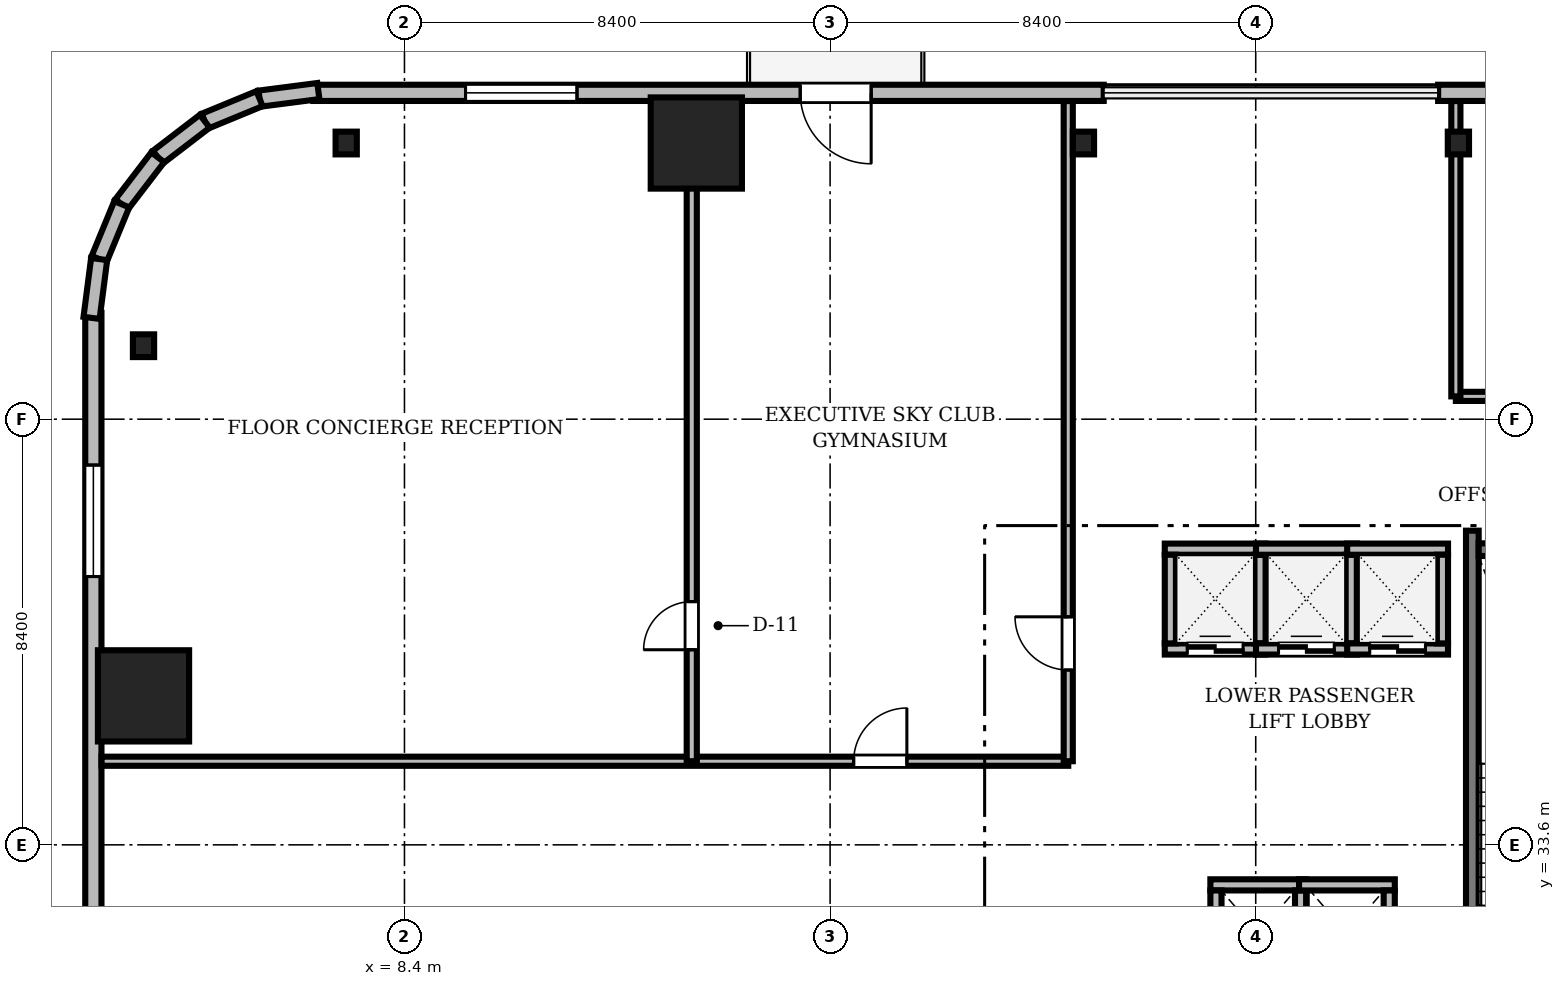
"""IFC4 building model, lengths in metres.
Left out: names, types, materials, properties, quantities, classifications, styles, units other than length and angle.
Written with IfcOpenShell. Run it as: python <this file> out.ifc"""

import sys

from ifc_helpers import new_model, si_unit, direction, frame, frame_2d, origin, origin_2d, place, context, subcontext, project, spatial, rectangle, i_section, extrude, source, transform, mapped, element, fill, save


model = new_model("IFC4")
c1 = context("Model", 3, precision=1e-05, world=origin(), true_north=direction((0.0, 1.0)))
c2 = subcontext(c1, "Body", "Model", "MODEL_VIEW")
j1 = project(units=[si_unit("LENGTHUNIT", "METRE"), si_unit("PLANEANGLEUNIT", "RADIAN")], contexts=[c1])
p1 = place(None, origin())
s1 = spatial("IfcSite", under=j1, at=p1, CompositionType="ELEMENT")
p2 = place(p1, origin())
s2 = spatial("IfcBuilding", under=s1, at=p2, CompositionType="ELEMENT")
p3 = place(p2, frame((0.0, 0.0, 82.35)))
s3 = spatial("IfcBuildingStorey", under=s2, at=p3, CompositionType="ELEMENT", Elevation=82.35)
m1 = source(origin(), c2, "Body", "SweptSolid", [
    extrude(rectangle(XDim=1.8, YDim=1.8, at=origin_2d()), origin(), (0.0, 0.0, 1.0), 3.41),
])
for number, where, z_axis, x_axis in (
    (1, (14.16, 47.45, 0.0), (0.0, 0.0, 1.0), (1.0, 0.0, 0.0)),
    (2, (3.25, 36.54, 0.0), (0.0, 0.0, 1.0), (1.0, 0.0, 0.0)),
):
    element("IfcColumn", number, at=place(p3, frame(where, z_axis=z_axis, x_axis=x_axis)), inside=s3, PredefinedType="COLUMN", context=c2, shape_type="MappedRepresentation", body=[
        mapped(m1, transform((0.0, 0.0, 0.0), scale=1.0)),
    ])
m2 = source(origin(), c2, "Body", "SweptSolid", [
    extrude(i_section(OverallWidth=0.419, OverallDepth=0.449, WebThickness=0.031, FlangeThickness=0.048, FilletRadius=0.015, at=origin_2d()), origin(), (0.0, 0.0, 1.0), 3.41),
])
for number, where, z_axis, x_axis in (
    (3, (29.2, 47.45, 0.0), (0.0, 0.0, 1.0), (1.0, 0.0, 0.0)),
    (4, (21.8, 47.45, 0.0), (0.0, 0.0, 1.0), (1.0, 0.0, 0.0)),
    (5, (7.25, 47.45, 0.0), (0.0, 0.0, 1.0), (1.0, 0.0, 0.0)),
    (6, (3.25, 43.45, 0.0), (0.0, 0.0, 1.0), (1.0, 0.0, 0.0)),
):
    element("IfcColumn", number, at=place(p3, frame(where, z_axis=z_axis, x_axis=x_axis)), inside=s3, PredefinedType="COLUMN", context=c2, shape_type="MappedRepresentation", body=[
        mapped(m2, transform((0.0, 0.0, 0.0), scale=1.0)),
    ])
m3 = source(origin(), c2, "Body", "SweptSolid", [
    extrude(rectangle(XDim=15.6, YDim=0.32, at=frame_2d((7.8, 0.0))), origin(), (0.0, 0.0, 1.0), 3.41),
])
p4 = place(p3, frame((44.4, 48.44, 0.0), z_axis=(0.0, 0.0, 1.0), x_axis=(-1.0, 0.0, 0.0)))
e7 = element("IfcWall", 7, at=p4, inside=s3, PredefinedType="SOLIDWALL", context=c2, shape_type="MappedRepresentation", body=[
    mapped(m3, transform((0.0, 0.0, 0.0), scale=1.0)),
])
m4 = source(origin(), c2, "Body", "SweptSolid", [
    extrude(rectangle(XDim=2.2, YDim=2.4, at=frame_2d((1.1, 1.2))), frame((0.0, 0.17, 0.0), z_axis=(0.0, -1.0, 0.0), x_axis=(1.0, 0.0, 0.0)), (0.0, 0.0, 1.0), 0.34),
])
p5 = place(p4, frame((3.005, 0.0, 0.72)))
e8 = element("IfcOpeningElement", 8, at=p5, cuts=e7, PredefinedType="OPENING", context=c2, shape_type="MappedRepresentation", body=[
    mapped(m4, transform((0.0, 0.0, 0.0), scale=1.0)),
])
p6 = place(p3, frame((22.2, 48.44, 0.0), z_axis=(0.0, 0.0, 1.0), x_axis=(-1.0, 0.0, 0.0)))
e9 = element("IfcWall", 9, at=p6, inside=s3, PredefinedType="SOLIDWALL", context=c2, shape_type="MappedRepresentation", body=[
    mapped(m3, transform((0.0, 0.0, 0.0), scale=1.0)),
])
m5 = source(origin(), c2, "Body", "SweptSolid", [
    extrude(rectangle(XDim=1.4, YDim=2.3, at=frame_2d((0.7, 1.15))), frame((0.0, 0.17, 0.0), z_axis=(0.0, -1.0, 0.0), x_axis=(1.0, 0.0, 0.0)), (0.0, 0.0, 1.0), 0.34),
])
p7 = place(p6, frame((4.59, 0.0, 0.0)))
e10 = element("IfcOpeningElement", 10, at=p7, cuts=e9, PredefinedType="OPENING", context=c2, shape_type="MappedRepresentation", body=[
    mapped(m5, transform((0.0, 0.0, 0.0), scale=1.0)),
])
p8 = place(p6, frame((10.395, 0.0, 0.72)))
e11 = element("IfcOpeningElement", 11, at=p8, cuts=e9, PredefinedType="OPENING", context=c2, shape_type="MappedRepresentation", body=[
    mapped(m4, transform((0.0, 0.0, 0.0), scale=1.0)),
])
m6 = source(origin(), c2, "Body", "SweptSolid", [
    extrude(rectangle(XDim=15.6, YDim=0.32, at=frame_2d((7.8, 0.0))), origin(), (0.0, 0.0, 1.0), 3.41),
])
p9 = place(p3, frame((2.26, 44.1, 0.0), z_axis=(0.0, 0.0, 1.0), x_axis=(0.0, -1.0, 0.0)))
e12 = element("IfcWall", 12, at=p9, inside=s3, PredefinedType="SOLIDWALL", context=c2, shape_type="MappedRepresentation", body=[
    mapped(m6, transform((0.0, 0.0, 0.0), scale=1.0)),
])
p10 = place(p9, frame((3.005, 0.0, 0.72)))
e13 = element("IfcOpeningElement", 13, at=p10, cuts=e12, PredefinedType="OPENING", context=c2, shape_type="MappedRepresentation", body=[
    mapped(m4, transform((0.0, 0.0, 0.0), scale=1.0)),
])
m7 = source(origin(), c2, "Body", "SweptSolid", [
    extrude(rectangle(XDim=1.17, YDim=0.32, at=frame_2d((0.585, 0.0))), origin(), (0.0, 0.0, 1.0), 3.41),
])
p11 = place(p3, frame((6.7, 48.476, 0.0), z_axis=(0.0, 0.0, 1.0), x_axis=(-0.991735963317, -0.128295670475, 0.0)))
e14 = element("IfcWall", 14, at=p11, inside=s3, PredefinedType="SOLIDWALL", context=c2, shape_type="MappedRepresentation", body=[
    mapped(m7, transform((0.0, 0.0, 0.0), scale=1.0)),
])
m8 = source(origin(), c2, "Body", "SweptSolid", [
    extrude(rectangle(XDim=1.169, YDim=0.32, at=frame_2d((0.584, 0.0))), origin(), (0.0, 0.0, 1.0), 3.41),
])
p12 = place(p3, frame((5.54, 48.325, 0.0), z_axis=(0.0, 0.0, 1.0), x_axis=(-0.924552646638, -0.381054331552, 0.0)))
e15 = element("IfcWall", 15, at=p12, inside=s3, PredefinedType="SOLIDWALL", context=c2, shape_type="MappedRepresentation", body=[
    mapped(m8, transform((0.0, 0.0, 0.0), scale=1.0)),
])
m9 = source(origin(), c2, "Body", "SweptSolid", [
    extrude(rectangle(XDim=1.169, YDim=0.32, at=frame_2d((0.584, 0.0))), origin(), (0.0, 0.0, 1.0), 3.41),
])
p13 = place(p3, frame((4.459, 47.88, 0.0), z_axis=(0.0, 0.0, 1.0), x_axis=(-0.793663520347, -0.608356981114, 0.0)))
e16 = element("IfcWall", 16, at=p13, inside=s3, PredefinedType="SOLIDWALL", context=c2, shape_type="MappedRepresentation", body=[
    mapped(m9, transform((0.0, 0.0, 0.0), scale=1.0)),
])
m10 = source(origin(), c2, "Body", "SweptSolid", [
    extrude(rectangle(XDim=1.169, YDim=0.32, at=frame_2d((0.584, 0.0))), origin(), (0.0, 0.0, 1.0), 3.41),
])
p14 = place(p3, frame((3.531, 47.169, 0.0), z_axis=(0.0, 0.0, 1.0), x_axis=(-0.608387696831, -0.793639975269, 0.0)))
e17 = element("IfcWall", 17, at=p14, inside=s3, PredefinedType="SOLIDWALL", context=c2, shape_type="MappedRepresentation", body=[
    mapped(m10, transform((0.0, 0.0, 0.0), scale=1.0)),
])
p15 = place(p3, frame((2.82, 46.241, 0.0), z_axis=(0.0, 0.0, 1.0), x_axis=(-0.381054331552, -0.924552646638, 0.0)))
e18 = element("IfcWall", 18, at=p15, inside=s3, PredefinedType="SOLIDWALL", context=c2, shape_type="MappedRepresentation", body=[
    mapped(m8, transform((0.0, 0.0, 0.0), scale=1.0)),
])
p16 = place(p3, frame((2.375, 45.16, 0.0), z_axis=(0.0, 0.0, 1.0), x_axis=(-0.128295670475, -0.991735963317, 0.0)))
e19 = element("IfcWall", 19, at=p16, inside=s3, PredefinedType="SOLIDWALL", context=c2, shape_type="MappedRepresentation", body=[
    mapped(m7, transform((0.0, 0.0, 0.0), scale=1.0)),
])
m11 = source(origin(), c2, "Body", "SweptSolid", [
    extrude(rectangle(XDim=9.15, YDim=0.25, at=frame_2d((4.575, 0.0))), origin(), (0.0, 0.0, 1.0), 3.45),
])
p17 = place(p3, frame((29.475, 30.65, 0.0), z_axis=(0.0, 0.0, 1.0), x_axis=(0.0, 1.0, 0.0)))
e20 = element("IfcWall", 20, at=p17, inside=s3, PredefinedType="SOLIDWALL", context=c2, shape_type="MappedRepresentation", body=[
    mapped(m11, transform((0.0, 0.0, 0.0), scale=1.0)),
])
m12 = source(origin(), c2, "Body", "SweptSolid", [
    extrude(rectangle(XDim=3.15, YDim=0.25, at=frame_2d((1.575, 0.0))), origin(), (0.0, 0.0, 1.0), 3.45),
])
p18 = place(p3, frame((29.6, 39.425, 0.0), z_axis=(0.0, 0.0, 1.0), x_axis=(1.0, 0.0, 0.0)))
e21 = element("IfcWall", 21, at=p18, inside=s3, PredefinedType="SOLIDWALL", context=c2, shape_type="MappedRepresentation", body=[
    mapped(m12, transform((0.0, 0.0, 0.0), scale=1.0)),
])
m13 = source(origin(), c2, "Body", "SweptSolid", [
    extrude(rectangle(XDim=1.99, YDim=0.22, at=frame_2d((0.995, 0.0))), origin(), (0.0, 0.0, 1.0), 3.41),
])
p19 = place(p3, frame((23.405, 37.465, 0.0), z_axis=(0.0, 0.0, 1.0), x_axis=(1.0, 0.0, 0.0)))
e22 = element("IfcWall", 22, at=p19, inside=s3, PredefinedType="SOLIDWALL", context=c2, shape_type="MappedRepresentation", body=[
    mapped(m13, transform((0.0, 0.0, 0.0), scale=1.0)),
])
m14 = source(origin(), c2, "Body", "SweptSolid", [
    extrude(rectangle(XDim=1.1, YDim=2.2, at=frame_2d((0.55, 1.1))), frame((0.0, 0.12, 0.0), z_axis=(0.0, -1.0, 0.0), x_axis=(1.0, 0.0, 0.0)), (0.0, 0.0, 1.0), 0.24),
])
p20 = place(p19, frame((0.445, 0.0, 0.0)))
e23 = element("IfcOpeningElement", 23, at=p20, cuts=e22, PredefinedType="OPENING", context=c2, shape_type="MappedRepresentation", body=[
    mapped(m14, transform((0.0, 0.0, 0.0), scale=1.0)),
])
p21 = place(p3, frame((23.405, 39.435, 0.0), z_axis=(0.0, 0.0, 1.0), x_axis=(1.0, 0.0, 0.0)))
e24 = element("IfcWall", 24, at=p21, inside=s3, PredefinedType="SOLIDWALL", context=c2, shape_type="MappedRepresentation", body=[
    mapped(m13, transform((0.0, 0.0, 0.0), scale=1.0)),
])
m15 = source(origin(), c2, "Body", "SweptSolid", [
    extrude(rectangle(XDim=1.75, YDim=0.22, at=frame_2d((0.875, 0.0))), origin(), (0.0, 0.0, 1.0), 3.41),
])
for number, where, z_axis, x_axis in (
    (25, (23.515, 37.575, 0.0), (0.0, 0.0, 1.0), (0.0, 1.0, 0.0)),
    (26, (25.285, 37.575, 0.0), (0.0, 0.0, 1.0), (0.0, 1.0, 0.0)),
):
    element("IfcWall", number, at=place(p3, frame(where, z_axis=z_axis, x_axis=x_axis)), inside=s3, PredefinedType="SOLIDWALL", context=c2, shape_type="MappedRepresentation", body=[
        mapped(m15, transform((0.0, 0.0, 0.0), scale=1.0)),
    ])
p22 = place(p3, frame((25.205, 37.465, 0.0), z_axis=(0.0, 0.0, 1.0), x_axis=(1.0, 0.0, 0.0)))
e27 = element("IfcWall", 27, at=p22, inside=s3, PredefinedType="SOLIDWALL", context=c2, shape_type="MappedRepresentation", body=[
    mapped(m13, transform((0.0, 0.0, 0.0), scale=1.0)),
])
p23 = place(p22, frame((0.445, 0.0, 0.0)))
e28 = element("IfcOpeningElement", 28, at=p23, cuts=e27, PredefinedType="OPENING", context=c2, shape_type="MappedRepresentation", body=[
    mapped(m14, transform((0.0, 0.0, 0.0), scale=1.0)),
])
p24 = place(p3, frame((25.205, 39.435, 0.0), z_axis=(0.0, 0.0, 1.0), x_axis=(1.0, 0.0, 0.0)))
e29 = element("IfcWall", 29, at=p24, inside=s3, PredefinedType="SOLIDWALL", context=c2, shape_type="MappedRepresentation", body=[
    mapped(m13, transform((0.0, 0.0, 0.0), scale=1.0)),
])
p25 = place(p3, frame((27.085, 37.575, 0.0), z_axis=(0.0, 0.0, 1.0), x_axis=(0.0, 1.0, 0.0)))
e30 = element("IfcWall", 30, at=p25, inside=s3, PredefinedType="SOLIDWALL", context=c2, shape_type="MappedRepresentation", body=[
    mapped(m15, transform((0.0, 0.0, 0.0), scale=1.0)),
])
m16 = source(origin(), c2, "Body", "SweptSolid", [
    extrude(rectangle(XDim=1.99, YDim=0.22, at=frame_2d((0.995, 0.0))), origin(), (0.0, 0.0, 1.0), 3.41),
])
p26 = place(p3, frame((27.005, 37.465, 0.0), z_axis=(0.0, 0.0, 1.0), x_axis=(1.0, 0.0, 0.0)))
e31 = element("IfcWall", 31, at=p26, inside=s3, PredefinedType="SOLIDWALL", context=c2, shape_type="MappedRepresentation", body=[
    mapped(m16, transform((0.0, 0.0, 0.0), scale=1.0)),
])
p27 = place(p26, frame((0.445, 0.0, 0.0)))
e32 = element("IfcOpeningElement", 32, at=p27, cuts=e31, PredefinedType="OPENING", context=c2, shape_type="MappedRepresentation", body=[
    mapped(m14, transform((0.0, 0.0, 0.0), scale=1.0)),
])
p28 = place(p3, frame((27.005, 39.435, 0.0), z_axis=(0.0, 0.0, 1.0), x_axis=(1.0, 0.0, 0.0)))
e33 = element("IfcWall", 33, at=p28, inside=s3, PredefinedType="SOLIDWALL", context=c2, shape_type="MappedRepresentation", body=[
    mapped(m16, transform((0.0, 0.0, 0.0), scale=1.0)),
])
p29 = place(p3, frame((28.885, 37.575, 0.0), z_axis=(0.0, 0.0, 1.0), x_axis=(0.0, 1.0, 0.0)))
e34 = element("IfcWall", 34, at=p29, inside=s3, PredefinedType="SOLIDWALL", context=c2, shape_type="MappedRepresentation", body=[
    mapped(m15, transform((0.0, 0.0, 0.0), scale=1.0)),
])
m17 = source(origin(), c2, "Body", "SweptSolid", [
    extrude(rectangle(XDim=1.89, YDim=0.22, at=frame_2d((0.945, 0.0))), origin(), (0.0, 0.0, 1.0), 3.41),
])
p30 = place(p3, frame((24.305, 32.81, 0.0), z_axis=(0.0, 0.0, 1.0), x_axis=(1.0, 0.0, 0.0)))
e35 = element("IfcWall", 35, at=p30, inside=s3, PredefinedType="SOLIDWALL", context=c2, shape_type="MappedRepresentation", body=[
    mapped(m17, transform((0.0, 0.0, 0.0), scale=1.0)),
])
m18 = source(origin(), c2, "Body", "SweptSolid", [
    extrude(rectangle(XDim=1.7, YDim=0.22, at=frame_2d((0.85, 0.0))), origin(), (0.0, 0.0, 1.0), 3.41),
])
for number, where, z_axis, x_axis in (
    (36, (24.415, 31.0, 0.0), (0.0, 0.0, 1.0), (0.0, 1.0, 0.0)),
    (37, (26.085, 31.0, 0.0), (0.0, 0.0, 1.0), (0.0, 1.0, 0.0)),
):
    element("IfcWall", number, at=place(p3, frame(where, z_axis=z_axis, x_axis=x_axis)), inside=s3, PredefinedType="SOLIDWALL", context=c2, shape_type="MappedRepresentation", body=[
        mapped(m18, transform((0.0, 0.0, 0.0), scale=1.0)),
    ])
p31 = place(p3, frame((26.055, 32.81, 0.0), z_axis=(0.0, 0.0, 1.0), x_axis=(1.0, 0.0, 0.0)))
e38 = element("IfcWall", 38, at=p31, inside=s3, PredefinedType="SOLIDWALL", context=c2, shape_type="MappedRepresentation", body=[
    mapped(m17, transform((0.0, 0.0, 0.0), scale=1.0)),
])
p32 = place(p3, frame((27.835, 31.0, 0.0), z_axis=(0.0, 0.0, 1.0), x_axis=(0.0, 1.0, 0.0)))
e39 = element("IfcWall", 39, at=p32, inside=s3, PredefinedType="SOLIDWALL", context=c2, shape_type="MappedRepresentation", body=[
    mapped(m18, transform((0.0, 0.0, 0.0), scale=1.0)),
])
m19 = source(origin(), c2, "Body", "SweptSolid", [
    extrude(rectangle(XDim=19.428, YDim=0.18, at=frame_2d((9.714, 0.0))), origin(), (0.0, 0.0, 1.0), 2.652),
])
p33 = place(p3, frame((29.15, 42.45, 0.0), z_axis=(0.0, 0.0, 1.0), x_axis=(1.0, 0.0, 0.0)))
e40 = element("IfcWall", 40, at=p33, inside=s3, PredefinedType="PARTITIONING", context=c2, shape_type="MappedRepresentation", body=[
    mapped(m19, transform((0.0, 0.0, 0.0), scale=1.0)),
])
m20 = source(origin(), c2, "Body", "SweptSolid", [
    extrude(rectangle(XDim=1.05, YDim=2.2, at=frame_2d((0.525, 1.1))), frame((0.0, 0.1, 0.0), z_axis=(0.0, -1.0, 0.0), x_axis=(1.0, 0.0, 0.0)), (0.0, 0.0, 1.0), 0.2),
])
p34 = place(p33, frame((4.5, 0.0, 0.0)))
e41 = element("IfcOpeningElement", 41, at=p34, cuts=e40, PredefinedType="OPENING", context=c2, shape_type="MappedRepresentation", body=[
    mapped(m20, transform((0.0, 0.0, 0.0), scale=1.0)),
])
m21 = source(origin(), c2, "Body", "SweptSolid", [
    extrude(rectangle(XDim=19.078, YDim=0.18, at=frame_2d((9.539, 0.0))), origin(), (0.0, 0.0, 1.0), 2.652),
])
p35 = place(p3, frame((2.422, 35.25, 0.0), z_axis=(0.0, 0.0, 1.0), x_axis=(1.0, 0.0, 0.0)))
e42 = element("IfcWall", 42, at=p35, inside=s3, PredefinedType="PARTITIONING", context=c2, shape_type="MappedRepresentation", body=[
    mapped(m21, transform((0.0, 0.0, 0.0), scale=1.0)),
])
p36 = place(p35, frame((14.843, 0.0, 0.0)))
e43 = element("IfcOpeningElement", 43, at=p36, cuts=e42, PredefinedType="OPENING", context=c2, shape_type="MappedRepresentation", body=[
    mapped(m20, transform((0.0, 0.0, 0.0), scale=1.0)),
])
m22 = source(origin(), c2, "Body", "SweptSolid", [
    extrude(rectangle(XDim=13.028, YDim=0.2, at=frame_2d((6.514, 0.0))), origin(), (0.0, 0.0, 1.0), 2.652),
])
p37 = place(p3, frame((14.07, 35.25, 0.0), z_axis=(0.0, 0.0, 1.0), x_axis=(0.0, 1.0, 0.0)))
e44 = element("IfcWall", 44, at=p37, inside=s3, PredefinedType="PARTITIONING", context=c2, shape_type="MappedRepresentation", body=[
    mapped(m22, transform((0.0, 0.0, 0.0), scale=1.0)),
])
m23 = source(origin(), c2, "Body", "SweptSolid", [
    extrude(rectangle(XDim=0.95, YDim=2.15, at=frame_2d((0.475, 1.075))), frame((0.0, 0.11, 0.0), z_axis=(0.0, -1.0, 0.0), x_axis=(1.0, 0.0, 0.0)), (0.0, 0.0, 1.0), 0.22),
])
p38 = place(p37, frame((2.2, 0.0, 0.0)))
e45 = element("IfcOpeningElement", 45, at=p38, cuts=e44, PredefinedType="OPENING", context=c2, shape_type="MappedRepresentation", body=[
    mapped(m23, transform((0.0, 0.0, 0.0), scale=1.0)),
])
m24 = source(origin(), c2, "Body", "SweptSolid", [
    extrude(rectangle(XDim=13.028, YDim=0.18, at=frame_2d((6.514, 0.0))), origin(), (0.0, 0.0, 1.0), 2.652),
])
p39 = place(p3, frame((21.5, 35.25, 0.0), z_axis=(0.0, 0.0, 1.0), x_axis=(0.0, 1.0, 0.0)))
e46 = element("IfcWall", 46, at=p39, inside=s3, PredefinedType="PARTITIONING", context=c2, shape_type="MappedRepresentation", body=[
    mapped(m24, transform((0.0, 0.0, 0.0), scale=1.0)),
])
p40 = place(p39, frame((1.8, 0.0, 0.0)))
e47 = element("IfcOpeningElement", 47, at=p40, cuts=e46, PredefinedType="OPENING", context=c2, shape_type="MappedRepresentation", body=[
    mapped(m20, transform((0.0, 0.0, 0.0), scale=1.0)),
])
m25 = source(origin(), c2, "Body", "SweptSolid", [
    extrude(rectangle(XDim=5.828, YDim=0.18, at=frame_2d((2.914, 0.0))), origin(), (0.0, 0.0, 1.0), 2.652),
])
p41 = place(p3, frame((29.15, 42.45, 0.0), z_axis=(0.0, 0.0, 1.0), x_axis=(0.0, 1.0, 0.0)))
e48 = element("IfcWall", 48, at=p41, inside=s3, PredefinedType="PARTITIONING", context=c2, shape_type="MappedRepresentation", body=[
    mapped(m25, transform((0.0, 0.0, 0.0), scale=1.0)),
])
m26 = source(origin(), c2, "Body", "SweptSolid", [
    extrude(rectangle(XDim=1.4, YDim=2.3, at=frame_2d((0.7, 1.15))), frame((0.0, 0.025, 0.0), z_axis=(0.0, -1.0, 0.0), x_axis=(1.0, 0.0, 0.0)), (0.0, 0.0, 1.0), 0.05),
])
p42 = place(p7, frame((1.4, 0.0, 0.0), z_axis=(0.0, 0.0, 1.0), x_axis=(-1.0, 0.0, 0.0)))
e49 = element("IfcDoor", 49, at=p42, inside=s3, OperationType="DOUBLE_DOOR_SLIDING", PredefinedType="DOOR", context=c2, shape_type="MappedRepresentation", body=[
    mapped(m26, transform((0.0, 0.0, 0.0), scale=1.0)),
])
fill(e10, e49)
m27 = source(origin(), c2, "Body", "SweptSolid", [
    extrude(rectangle(XDim=2.2, YDim=2.4, at=frame_2d((1.1, 1.2))), frame((0.0, 0.03, 0.0), z_axis=(0.0, -1.0, 0.0), x_axis=(1.0, 0.0, 0.0)), (0.0, 0.0, 1.0), 0.06),
])
p43 = place(p8, origin())
e50 = element("IfcWindow", 50, at=p43, inside=s3, PartitioningType="SINGLE_PANEL", PredefinedType="WINDOW", context=c2, shape_type="MappedRepresentation", body=[
    mapped(m27, transform((0.0, 0.0, 0.0), scale=1.0)),
])
fill(e11, e50)
p44 = place(p10, origin())
e51 = element("IfcWindow", 51, at=p44, inside=s3, PartitioningType="SINGLE_PANEL", PredefinedType="WINDOW", context=c2, shape_type="MappedRepresentation", body=[
    mapped(m27, transform((0.0, 0.0, 0.0), scale=1.0)),
])
fill(e13, e51)
m28 = source(origin(), c2, "Body", "SweptSolid", [
    extrude(rectangle(XDim=1.1, YDim=2.2, at=frame_2d((0.55, 1.1))), frame((0.0, 0.025, 0.0), z_axis=(0.0, -1.0, 0.0), x_axis=(1.0, 0.0, 0.0)), (0.0, 0.0, 1.0), 0.05),
])
p45 = place(p20, origin())
e52 = element("IfcDoor", 52, at=p45, inside=s3, OperationType="DOUBLE_DOOR_SLIDING", PredefinedType="DOOR", context=c2, shape_type="MappedRepresentation", body=[
    mapped(m28, transform((0.0, 0.0, 0.0), scale=1.0)),
])
fill(e23, e52)
p46 = place(p23, origin())
e53 = element("IfcDoor", 53, at=p46, inside=s3, OperationType="DOUBLE_DOOR_SLIDING", PredefinedType="DOOR", context=c2, shape_type="MappedRepresentation", body=[
    mapped(m28, transform((0.0, 0.0, 0.0), scale=1.0)),
])
fill(e28, e53)
p47 = place(p27, origin())
e54 = element("IfcDoor", 54, at=p47, inside=s3, OperationType="DOUBLE_DOOR_SLIDING", PredefinedType="DOOR", context=c2, shape_type="MappedRepresentation", body=[
    mapped(m28, transform((0.0, 0.0, 0.0), scale=1.0)),
])
fill(e32, e54)
m29 = source(origin(), c2, "Body", "SweptSolid", [
    extrude(rectangle(XDim=1.05, YDim=2.2, at=frame_2d((0.525, 1.1))), frame((0.0, 0.025, 0.0), z_axis=(0.0, -1.0, 0.0), x_axis=(1.0, 0.0, 0.0)), (0.0, 0.0, 1.0), 0.05),
])
p48 = place(p36, origin())
e55 = element("IfcDoor", 55, at=p48, inside=s3, OperationType="SINGLE_SWING_RIGHT", PredefinedType="DOOR", context=c2, shape_type="MappedRepresentation", body=[
    mapped(m29, transform((0.0, 0.0, 0.0), scale=1.0)),
])
fill(e43, e55)
m30 = source(origin(), c2, "Body", "SweptSolid", [
    extrude(rectangle(XDim=0.95, YDim=2.15, at=frame_2d((0.475, 1.075))), frame((0.0, 0.025, 0.0), z_axis=(0.0, -1.0, 0.0), x_axis=(1.0, 0.0, 0.0)), (0.0, 0.0, 1.0), 0.05),
])
p49 = place(p38, origin())
e56 = element("IfcDoor", 56, at=p49, inside=s3, OperationType="SINGLE_SWING_LEFT", PredefinedType="DOOR", context=c2, shape_type="MappedRepresentation", body=[
    mapped(m30, transform((0.0, 0.0, 0.0), scale=1.0)),
])
fill(e45, e56)
p50 = place(p40, origin())
e57 = element("IfcDoor", 57, at=p50, inside=s3, OperationType="SINGLE_SWING_RIGHT", PredefinedType="DOOR", context=c2, shape_type="MappedRepresentation", body=[
    mapped(m29, transform((0.0, 0.0, 0.0), scale=1.0)),
])
fill(e47, e57)
save(model, sys.argv[1])
